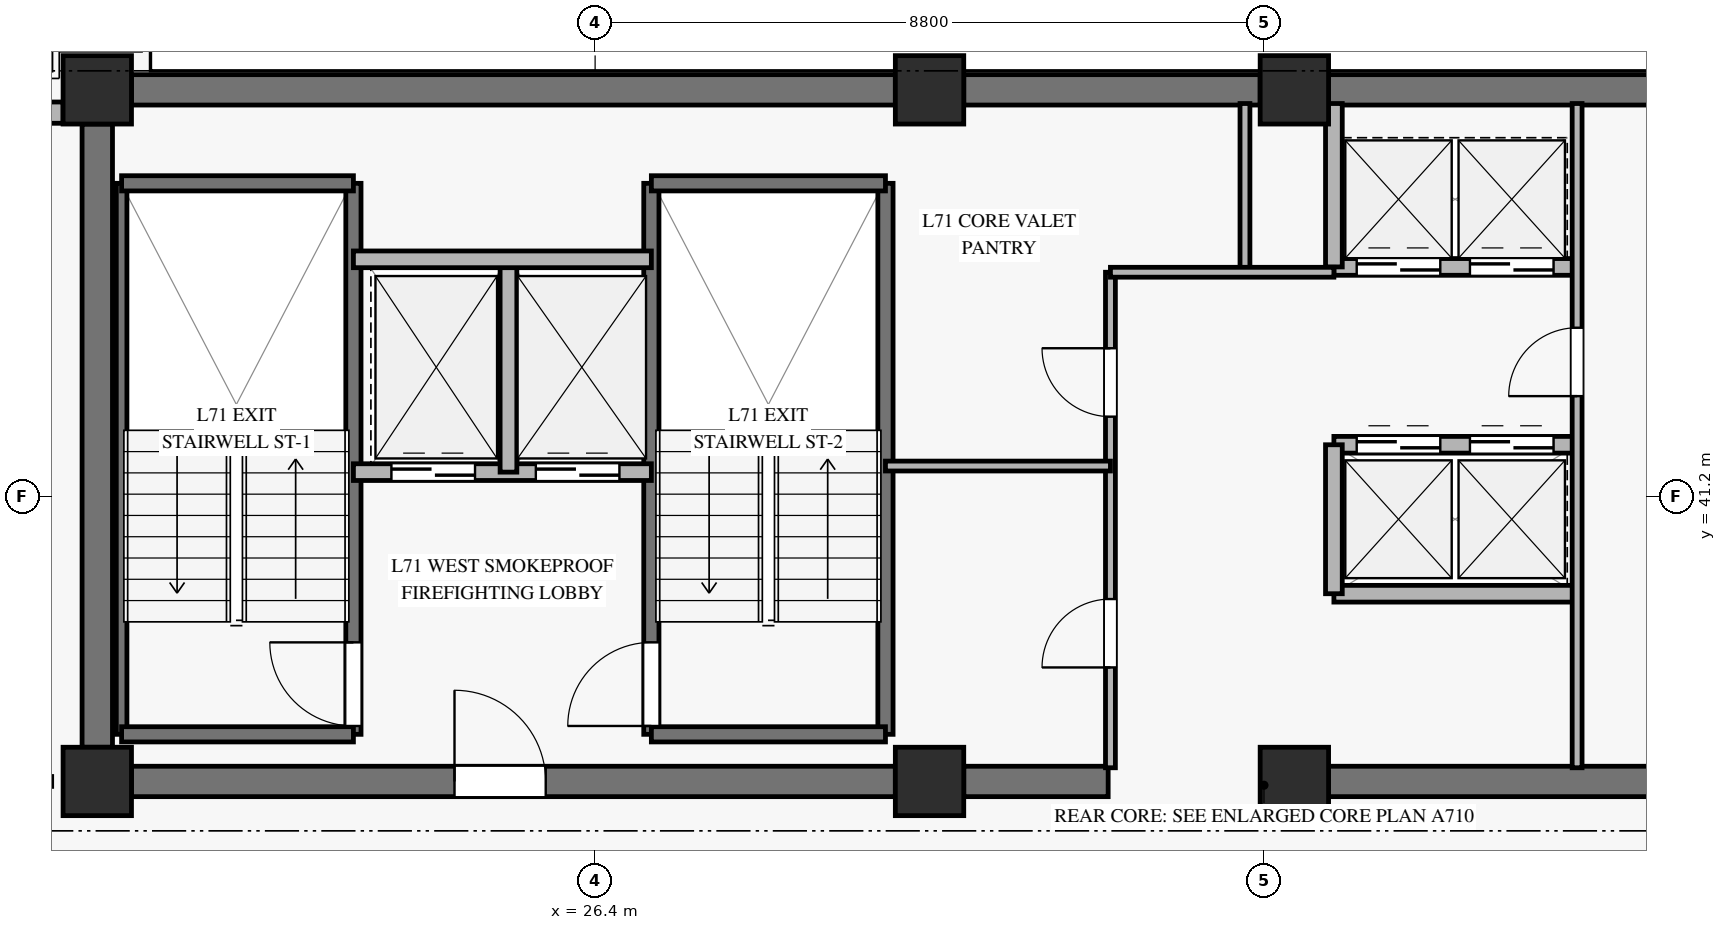
"""IFC4 building model, lengths in metres.
Left out: names, types, materials, properties, quantities, classifications, styles, units other than length and angle.
Written with IfcOpenShell. Run it as: python <this file> out.ifc"""

import sys

from ifc_helpers import new_model, si_unit, direction, frame, frame_2d, origin, origin_2d, place, context, subcontext, project, spatial, rectangle, extrude, source, transform, mapped, element, fill, save


model = new_model("IFC4")
c1 = context("Model", 3, precision=1e-05, world=origin(), true_north=direction((0.0, 1.0)))
c2 = subcontext(c1, "Body", "Model", "MODEL_VIEW")
j1 = project(units=[si_unit("LENGTHUNIT", "METRE"), si_unit("PLANEANGLEUNIT", "RADIAN")], contexts=[c1])
p1 = place(None, origin())
s1 = spatial("IfcSite", under=j1, at=p1, CompositionType="ELEMENT")
p2 = place(p1, origin())
s2 = spatial("IfcBuilding", under=s1, at=p2, CompositionType="ELEMENT")
p3 = place(p2, frame((0.0, 0.0, 275.7)))
s3 = spatial("IfcBuildingStorey", under=s2, at=p3, CompositionType="ELEMENT", Elevation=275.7)
m1 = source(origin(), c2, "Body", "SweptSolid", [
    extrude(rectangle(XDim=0.9, YDim=0.9, at=origin_2d()), origin(), (0.0, 0.0, 1.0), 3.14),
])
for number, where, z_axis, x_axis in (
    (1, (19.85, 37.45, 0.0), (0.0, 0.0, 1.0), (1.0, 0.0, 0.0)),
    (2, (19.85, 46.55, 0.0), (0.0, 0.0, 1.0), (1.0, 0.0, 0.0)),
    (3, (30.8, 37.45, 0.0), (0.0, 0.0, 1.0), (1.0, 0.0, 0.0)),
    (4, (30.8, 46.55, 0.0), (0.0, 0.0, 1.0), (1.0, 0.0, 0.0)),
    (5, (35.6, 37.45, 0.0), (0.0, 0.0, 1.0), (1.0, 0.0, 0.0)),
    (6, (35.6, 46.55, 0.0), (0.0, 0.0, 1.0), (1.0, 0.0, 0.0)),
):
    element("IfcColumn", number, at=place(p3, frame(where, z_axis=z_axis, x_axis=x_axis)), inside=s3, PredefinedType="PILASTER", context=c2, shape_type="MappedRepresentation", body=[
        mapped(m1, transform((0.0, 0.0, 0.0), x_axis=(1.0, 0.0, 0.0), y_axis=(0.0, 1.0, 0.0), z_axis=(0.0, 0.0, 1.0), scale=1.0)),
    ])
p4 = place(p3, frame((20.3, 46.55, 0.0), z_axis=(0.0, 0.0, 1.0), x_axis=(1.0, 0.0, 0.0)))
e7 = element("IfcWall", 7, at=p4, inside=s3, PredefinedType="SHEAR", context=c2, shape_type="SweptSolid", body=[
    extrude(rectangle(XDim=10.05, YDim=0.4, at=frame_2d((5.025, 0.0))), origin(), (0.0, 0.0, 1.0), 3.14),
])
p5 = place(p3, frame((31.25, 46.55, 0.0), z_axis=(0.0, 0.0, 1.0), x_axis=(1.0, 0.0, 0.0)))
e8 = element("IfcWall", 8, at=p5, inside=s3, PredefinedType="SHEAR", context=c2, shape_type="SweptSolid", body=[
    extrude(rectangle(XDim=3.9, YDim=0.4, at=frame_2d((1.95, 0.0))), origin(), (0.0, 0.0, 1.0), 3.14),
])
p6 = place(p3, frame((36.05, 46.55, 0.0), z_axis=(0.0, 0.0, 1.0), x_axis=(1.0, 0.0, 0.0)))
e9 = element("IfcWall", 9, at=p6, inside=s3, PredefinedType="SHEAR", context=c2, shape_type="SweptSolid", body=[
    extrude(rectangle(XDim=7.8, YDim=0.4, at=frame_2d((3.9, 0.0))), origin(), (0.0, 0.0, 1.0), 3.14),
])
p7 = place(p3, frame((20.3, 37.45, 0.0), z_axis=(0.0, 0.0, 1.0), x_axis=(1.0, 0.0, 0.0)))
e10 = element("IfcWall", 10, at=p7, inside=s3, PredefinedType="SHEAR", context=c2, shape_type="SweptSolid", body=[
    extrude(rectangle(XDim=10.05, YDim=0.4, at=frame_2d((5.025, 0.0))), origin(), (0.0, 0.0, 1.0), 3.14),
])
p8 = place(p7, frame((4.25, 0.0, 0.0)))
e11 = element("IfcOpeningElement", 11, at=p8, cuts=e10, PredefinedType="OPENING", context=c2, shape_type="SweptSolid", body=[
    extrude(rectangle(XDim=1.2, YDim=2.15, at=frame_2d((0.6, 1.075))), frame((0.0, 0.21, 0.0), z_axis=(0.0, -1.0, 0.0), x_axis=(1.0, 0.0, 0.0)), (0.0, 0.0, 1.0), 0.42),
])
p9 = place(p3, frame((31.25, 37.45, 0.0), z_axis=(0.0, 0.0, 1.0), x_axis=(1.0, 0.0, 0.0)))
e12 = element("IfcWall", 12, at=p9, inside=s3, PredefinedType="SHEAR", context=c2, shape_type="SweptSolid", body=[
    extrude(rectangle(XDim=1.9, YDim=0.4, at=frame_2d((0.95, 0.0))), origin(), (0.0, 0.0, 1.0), 3.14),
])
p10 = place(p3, frame((36.05, 37.45, 0.0), z_axis=(0.0, 0.0, 1.0), x_axis=(1.0, 0.0, 0.0)))
e13 = element("IfcWall", 13, at=p10, inside=s3, PredefinedType="SHEAR", context=c2, shape_type="SweptSolid", body=[
    extrude(rectangle(XDim=7.8, YDim=0.4, at=frame_2d((3.9, 0.0))), origin(), (0.0, 0.0, 1.0), 3.14),
])
p11 = place(p3, frame((19.85, 37.9, 0.0), z_axis=(0.0, 0.0, 1.0), x_axis=(0.0, 1.0, 0.0)))
e14 = element("IfcWall", 14, at=p11, inside=s3, PredefinedType="SHEAR", context=c2, shape_type="SweptSolid", body=[
    extrude(rectangle(XDim=8.2, YDim=0.4, at=frame_2d((4.1, 0.0))), origin(), (0.0, 0.0, 1.0), 3.14),
])
p12 = place(p3, frame((11.942, 46.25, 0.0), z_axis=(0.0, 0.0, 1.0), x_axis=(1.0, 0.0, 0.0)))
e15 = element("IfcWall", 15, at=p12, inside=s3, PredefinedType="SOLIDWALL", context=c2, shape_type="SweptSolid", body=[
    extrude(rectangle(XDim=7.458, YDim=0.28, at=frame_2d((3.729, 0.0))), origin(), (0.0, 0.0, 1.0), 2.77),
])
p13 = place(p12, frame((2.929, 0.0, 0.45)))
e16 = element("IfcOpeningElement", 16, at=p13, cuts=e15, PredefinedType="OPENING", context=c2, shape_type="SweptSolid", body=[
    extrude(rectangle(XDim=1.6, YDim=2.0, at=frame_2d((0.8, 1.0))), frame((0.0, 0.15, 0.0), z_axis=(0.0, -1.0, 0.0), x_axis=(1.0, 0.0, 0.0)), (0.0, 0.0, 1.0), 0.3),
])
p14 = place(p3, frame((20.17, 38.07, 0.0), z_axis=(0.0, 0.0, 1.0), x_axis=(0.0, 1.0, 0.0)))
e17 = element("IfcWall", 17, at=p14, inside=s3, PredefinedType="SOLIDWALL", context=c2, shape_type="SweptSolid", body=[
    extrude(rectangle(XDim=7.25, YDim=0.14, at=frame_2d((3.625, 0.0))), origin(), (0.0, 0.0, 1.0), 3.4),
])
p15 = place(p3, frame((23.22, 38.07, 0.0), z_axis=(0.0, 0.0, 1.0), x_axis=(0.0, 1.0, 0.0)))
e18 = element("IfcWall", 18, at=p15, inside=s3, PredefinedType="SOLIDWALL", context=c2, shape_type="SweptSolid", body=[
    extrude(rectangle(XDim=7.25, YDim=0.2, at=frame_2d((3.625, 0.0))), origin(), (0.0, 0.0, 1.0), 3.4),
])
p16 = place(p15, frame((0.11, 0.0, 0.0)))
e19 = element("IfcOpeningElement", 19, at=p16, cuts=e18, PredefinedType="OPENING", context=c2, shape_type="SweptSolid", body=[
    extrude(rectangle(XDim=1.1, YDim=2.15, at=frame_2d((0.55, 1.075))), frame((0.0, 0.11, 0.0), z_axis=(0.0, -1.0, 0.0), x_axis=(1.0, 0.0, 0.0)), (0.0, 0.0, 1.0), 0.22),
])
for number, where, z_axis, x_axis in (
    (20, (20.17, 45.32, 0.0), (0.0, 0.0, 1.0), (1.0, 0.0, 0.0)),
    (21, (20.17, 38.07, 0.0), (0.0, 0.0, 1.0), (1.0, 0.0, 0.0)),
):
    element("IfcWall", number, at=place(p3, frame(where, z_axis=z_axis, x_axis=x_axis)), inside=s3, PredefinedType="SOLIDWALL", context=c2, shape_type="SweptSolid", body=[
        extrude(rectangle(XDim=3.05, YDim=0.2, at=frame_2d((1.525, 0.0))), origin(), (0.0, 0.0, 1.0), 3.4),
    ])
p17 = place(p3, frame((27.14, 38.07, 0.0), z_axis=(0.0, 0.0, 1.0), x_axis=(0.0, 1.0, 0.0)))
e22 = element("IfcWall", 22, at=p17, inside=s3, PredefinedType="SOLIDWALL", context=c2, shape_type="SweptSolid", body=[
    extrude(rectangle(XDim=7.25, YDim=0.2, at=frame_2d((3.625, 0.0))), origin(), (0.0, 0.0, 1.0), 3.4),
])
p18 = place(p17, frame((0.11, 0.0, 0.0)))
e23 = element("IfcOpeningElement", 23, at=p18, cuts=e22, PredefinedType="OPENING", context=c2, shape_type="SweptSolid", body=[
    extrude(rectangle(XDim=1.1, YDim=2.15, at=frame_2d((0.55, 1.075))), frame((0.0, 0.11, 0.0), z_axis=(0.0, -1.0, 0.0), x_axis=(1.0, 0.0, 0.0)), (0.0, 0.0, 1.0), 0.22),
])
p19 = place(p3, frame((30.22, 38.07, 0.0), z_axis=(0.0, 0.0, 1.0), x_axis=(0.0, 1.0, 0.0)))
e24 = element("IfcWall", 24, at=p19, inside=s3, PredefinedType="SOLIDWALL", context=c2, shape_type="SweptSolid", body=[
    extrude(rectangle(XDim=7.25, YDim=0.2, at=frame_2d((3.625, 0.0))), origin(), (0.0, 0.0, 1.0), 3.4),
])
for number, where, z_axis, x_axis in (
    (25, (27.14, 45.32, 0.0), (0.0, 0.0, 1.0), (1.0, 0.0, 0.0)),
    (26, (27.14, 38.07, 0.0), (0.0, 0.0, 1.0), (1.0, 0.0, 0.0)),
):
    element("IfcWall", number, at=place(p3, frame(where, z_axis=z_axis, x_axis=x_axis)), inside=s3, PredefinedType="SOLIDWALL", context=c2, shape_type="SweptSolid", body=[
        extrude(rectangle(XDim=3.08, YDim=0.2, at=frame_2d((1.54, 0.0))), origin(), (0.0, 0.0, 1.0), 3.4),
    ])
p20 = place(p3, frame((23.22, 41.52, 0.0), z_axis=(0.0, 0.0, 1.0), x_axis=(1.0, 0.0, 0.0)))
e27 = element("IfcWall", 27, at=p20, inside=s3, PredefinedType="SOLIDWALL", context=c2, shape_type="SweptSolid", body=[
    extrude(rectangle(XDim=3.92, YDim=0.22, at=frame_2d((1.96, 0.0))), origin(), (0.0, 0.0, 1.0), 3.14),
])
p21 = place(p20, frame((0.5, 0.0, 0.0)))
e28 = element("IfcOpeningElement", 28, at=p21, cuts=e27, PredefinedType="OPENING", context=c2, shape_type="SweptSolid", body=[
    extrude(rectangle(XDim=1.1, YDim=2.2, at=frame_2d((0.55, 1.1))), frame((0.0, 0.12, 0.0), z_axis=(0.0, -1.0, 0.0), x_axis=(1.0, 0.0, 0.0)), (0.0, 0.0, 1.0), 0.24),
])
p22 = place(p20, frame((2.4, 0.0, 0.0)))
e29 = element("IfcOpeningElement", 29, at=p22, cuts=e27, PredefinedType="OPENING", context=c2, shape_type="SweptSolid", body=[
    extrude(rectangle(XDim=1.1, YDim=2.2, at=frame_2d((0.55, 1.1))), frame((0.0, 0.12, 0.0), z_axis=(0.0, -1.0, 0.0), x_axis=(1.0, 0.0, 0.0)), (0.0, 0.0, 1.0), 0.24),
])
p23 = place(p3, frame((25.26, 41.52, 0.0), z_axis=(0.0, 0.0, 1.0), x_axis=(0.0, 1.0, 0.0)))
e30 = element("IfcWall", 30, at=p23, inside=s3, PredefinedType="SOLIDWALL", context=c2, shape_type="SweptSolid", body=[
    extrude(rectangle(XDim=2.8, YDim=0.22, at=frame_2d((1.4, 0.0))), origin(), (0.0, 0.0, 1.0), 3.14),
])
p24 = place(p3, frame((23.22, 44.32, 0.0), z_axis=(0.0, 0.0, 1.0), x_axis=(1.0, 0.0, 0.0)))
e31 = element("IfcWall", 31, at=p24, inside=s3, PredefinedType="SOLIDWALL", context=c2, shape_type="SweptSolid", body=[
    extrude(rectangle(XDim=3.92, YDim=0.22, at=frame_2d((1.96, 0.0))), origin(), (0.0, 0.0, 1.0), 3.14),
])
p25 = place(p3, frame((36.12, 44.22, 0.0), z_axis=(0.0, 0.0, 1.0), x_axis=(1.0, 0.0, 0.0)))
e32 = element("IfcWall", 32, at=p25, inside=s3, PredefinedType="SOLIDWALL", context=c2, shape_type="SweptSolid", body=[
    extrude(rectangle(XDim=3.2, YDim=0.22, at=frame_2d((1.6, 0.0))), origin(), (0.0, 0.0, 1.0), 3.14),
])
p26 = place(p25, frame((0.3, 0.0, 0.0)))
e33 = element("IfcOpeningElement", 33, at=p26, cuts=e32, PredefinedType="OPENING", context=c2, shape_type="SweptSolid", body=[
    extrude(rectangle(XDim=1.1, YDim=2.2, at=frame_2d((0.55, 1.1))), frame((0.0, 0.12, 0.0), z_axis=(0.0, -1.0, 0.0), x_axis=(1.0, 0.0, 0.0)), (0.0, 0.0, 1.0), 0.24),
])
p27 = place(p25, frame((1.79, 0.0, 0.0)))
e34 = element("IfcOpeningElement", 34, at=p27, cuts=e32, PredefinedType="OPENING", context=c2, shape_type="SweptSolid", body=[
    extrude(rectangle(XDim=1.1, YDim=2.2, at=frame_2d((0.55, 1.1))), frame((0.0, 0.12, 0.0), z_axis=(0.0, -1.0, 0.0), x_axis=(1.0, 0.0, 0.0)), (0.0, 0.0, 1.0), 0.24),
])
p28 = place(p3, frame((36.12, 41.88, 0.0), z_axis=(0.0, 0.0, 1.0), x_axis=(1.0, 0.0, 0.0)))
e35 = element("IfcWall", 35, at=p28, inside=s3, PredefinedType="SOLIDWALL", context=c2, shape_type="SweptSolid", body=[
    extrude(rectangle(XDim=3.2, YDim=0.22, at=frame_2d((1.6, 0.0))), origin(), (0.0, 0.0, 1.0), 3.14),
])
p29 = place(p28, frame((0.3, 0.0, 0.0)))
e36 = element("IfcOpeningElement", 36, at=p29, cuts=e35, PredefinedType="OPENING", context=c2, shape_type="SweptSolid", body=[
    extrude(rectangle(XDim=1.1, YDim=2.2, at=frame_2d((0.55, 1.1))), frame((0.0, 0.12, 0.0), z_axis=(0.0, -1.0, 0.0), x_axis=(1.0, 0.0, 0.0)), (0.0, 0.0, 1.0), 0.24),
])
p30 = place(p28, frame((1.79, 0.0, 0.0)))
e37 = element("IfcOpeningElement", 37, at=p30, cuts=e35, PredefinedType="OPENING", context=c2, shape_type="SweptSolid", body=[
    extrude(rectangle(XDim=1.1, YDim=2.2, at=frame_2d((0.55, 1.1))), frame((0.0, 0.12, 0.0), z_axis=(0.0, -1.0, 0.0), x_axis=(1.0, 0.0, 0.0)), (0.0, 0.0, 1.0), 0.24),
])
p31 = place(p3, frame((36.12, 39.92, 0.0), z_axis=(0.0, 0.0, 1.0), x_axis=(1.0, 0.0, 0.0)))
e38 = element("IfcWall", 38, at=p31, inside=s3, PredefinedType="SOLIDWALL", context=c2, shape_type="SweptSolid", body=[
    extrude(rectangle(XDim=3.2, YDim=0.22, at=frame_2d((1.6, 0.0))), origin(), (0.0, 0.0, 1.0), 3.14),
])
p32 = place(p3, frame((36.12, 39.92, 0.0), z_axis=(0.0, 0.0, 1.0), x_axis=(0.0, 1.0, 0.0)))
e39 = element("IfcWall", 39, at=p32, inside=s3, PredefinedType="SOLIDWALL", context=c2, shape_type="SweptSolid", body=[
    extrude(rectangle(XDim=1.96, YDim=0.22, at=frame_2d((0.98, 0.0))), origin(), (0.0, 0.0, 1.0), 3.14),
])
p33 = place(p3, frame((36.12, 44.22, 0.0), z_axis=(0.0, 0.0, 1.0), x_axis=(0.0, 1.0, 0.0)))
e40 = element("IfcWall", 40, at=p33, inside=s3, PredefinedType="SOLIDWALL", context=c2, shape_type="SweptSolid", body=[
    extrude(rectangle(XDim=2.15, YDim=0.22, at=frame_2d((1.075, 0.0))), origin(), (0.0, 0.0, 1.0), 3.14),
])
p34 = place(p3, frame((33.18, 37.63, 0.0), z_axis=(0.0, 0.0, 1.0), x_axis=(0.0, 1.0, 0.0)))
e41 = element("IfcWall", 41, at=p34, inside=s3, PredefinedType="PARTITIONING", context=c2, shape_type="SweptSolid", body=[
    extrude(rectangle(XDim=6.52, YDim=0.13, at=frame_2d((3.26, 0.0))), origin(), (0.0, 0.0, 1.0), 2.225),
])
p35 = place(p34, frame((1.32, 0.0, 0.0)))
e42 = element("IfcOpeningElement", 42, at=p35, cuts=e41, PredefinedType="OPENING", context=c2, shape_type="SweptSolid", body=[
    extrude(rectangle(XDim=0.9, YDim=2.1, at=frame_2d((0.45, 1.05))), frame((0.0, 0.075, 0.0), z_axis=(0.0, -1.0, 0.0), x_axis=(1.0, 0.0, 0.0)), (0.0, 0.0, 1.0), 0.15),
])
p36 = place(p34, frame((4.62, 0.0, 0.0)))
e43 = element("IfcOpeningElement", 43, at=p36, cuts=e41, PredefinedType="OPENING", context=c2, shape_type="SweptSolid", body=[
    extrude(rectangle(XDim=0.9, YDim=2.1, at=frame_2d((0.45, 1.05))), frame((0.0, 0.075, 0.0), z_axis=(0.0, -1.0, 0.0), x_axis=(1.0, 0.0, 0.0)), (0.0, 0.0, 1.0), 0.15),
])
p37 = place(p3, frame((34.95, 44.15, 0.0), z_axis=(0.0, 0.0, 1.0), x_axis=(0.0, 1.0, 0.0)))
e44 = element("IfcWall", 44, at=p37, inside=s3, PredefinedType="PARTITIONING", context=c2, shape_type="SweptSolid", body=[
    extrude(rectangle(XDim=2.22, YDim=0.13, at=frame_2d((1.11, 0.0))), origin(), (0.0, 0.0, 1.0), 3.14),
])
p38 = place(p3, frame((33.18, 44.15, 0.0), z_axis=(0.0, 0.0, 1.0), x_axis=(1.0, 0.0, 0.0)))
e45 = element("IfcWall", 45, at=p38, inside=s3, PredefinedType="PARTITIONING", context=c2, shape_type="SweptSolid", body=[
    extrude(rectangle(XDim=2.94, YDim=0.13, at=frame_2d((1.47, 0.0))), origin(), (0.0, 0.0, 1.0), 2.425),
])
p39 = place(p3, frame((39.32, 37.63, 0.0), z_axis=(0.0, 0.0, 1.0), x_axis=(0.0, 1.0, 0.0)))
e46 = element("IfcWall", 46, at=p39, inside=s3, PredefinedType="PARTITIONING", context=c2, shape_type="SweptSolid", body=[
    extrude(rectangle(XDim=8.74, YDim=0.13, at=frame_2d((4.37, 0.0))), origin(), (0.0, 0.0, 1.0), 3.14),
])
p40 = place(p39, frame((4.89, 0.0, 0.0)))
e47 = element("IfcOpeningElement", 47, at=p40, cuts=e46, PredefinedType="OPENING", context=c2, shape_type="SweptSolid", body=[
    extrude(rectangle(XDim=0.9, YDim=2.1, at=frame_2d((0.45, 1.05))), frame((0.0, 0.075, 0.0), z_axis=(0.0, -1.0, 0.0), x_axis=(1.0, 0.0, 0.0)), (0.0, 0.0, 1.0), 0.15),
])
p41 = place(p3, frame((30.22, 41.6, 0.0), z_axis=(0.0, 0.0, 1.0), x_axis=(1.0, 0.0, 0.0)))
e48 = element("IfcWall", 48, at=p41, inside=s3, PredefinedType="PARTITIONING", context=c2, shape_type="SweptSolid", body=[
    extrude(rectangle(XDim=2.96, YDim=0.13, at=frame_2d((1.48, 0.0))), origin(), (0.0, 0.0, 1.0), 2.425),
])
m2 = source(origin(), c2, "Body", "SweptSolid", [
    extrude(rectangle(XDim=1.1, YDim=2.15, at=frame_2d((0.55, 1.075))), frame((0.0, 0.025, 0.0), z_axis=(0.0, -1.0, 0.0), x_axis=(1.0, 0.0, 0.0)), (0.0, 0.0, 1.0), 0.05),
])
p42 = place(p16, origin())
e49 = element("IfcDoor", 49, at=p42, inside=s3, OperationType="SINGLE_SWING_RIGHT", PredefinedType="DOOR", context=c2, shape_type="MappedRepresentation", body=[
    mapped(m2, transform((0.0, 0.0, 0.0), x_axis=(1.0, 0.0, 0.0), y_axis=(0.0, 1.0, 0.0), z_axis=(0.0, 0.0, 1.0), scale=1.0)),
])
fill(e19, e49)
p43 = place(p18, origin())
e50 = element("IfcDoor", 50, at=p43, inside=s3, OperationType="SINGLE_SWING_LEFT", PredefinedType="DOOR", context=c2, shape_type="MappedRepresentation", body=[
    mapped(m2, transform((0.0, 0.0, 0.0), x_axis=(1.0, 0.0, 0.0), y_axis=(0.0, 1.0, 0.0), z_axis=(0.0, 0.0, 1.0), scale=1.0)),
])
fill(e23, e50)
m3 = source(origin(), c2, "Body", "SweptSolid", [
    extrude(rectangle(XDim=1.1, YDim=2.2, at=frame_2d((0.55, 1.1))), frame((0.0, 0.025, 0.0), z_axis=(0.0, -1.0, 0.0), x_axis=(1.0, 0.0, 0.0)), (0.0, 0.0, 1.0), 0.05),
])
p44 = place(p21, origin())
e51 = element("IfcDoor", 51, at=p44, inside=s3, OperationType="SLIDING_TO_LEFT", PredefinedType="DOOR", context=c2, shape_type="MappedRepresentation", body=[
    mapped(m3, transform((0.0, 0.0, 0.0), x_axis=(1.0, 0.0, 0.0), y_axis=(0.0, 1.0, 0.0), z_axis=(0.0, 0.0, 1.0), scale=1.0)),
])
fill(e28, e51)
p45 = place(p22, origin())
e52 = element("IfcDoor", 52, at=p45, inside=s3, OperationType="SLIDING_TO_LEFT", PredefinedType="DOOR", context=c2, shape_type="MappedRepresentation", body=[
    mapped(m3, transform((0.0, 0.0, 0.0), x_axis=(1.0, 0.0, 0.0), y_axis=(0.0, 1.0, 0.0), z_axis=(0.0, 0.0, 1.0), scale=1.0)),
])
fill(e29, e52)
m4 = source(origin(), c2, "Body", "SweptSolid", [
    extrude(rectangle(XDim=1.2, YDim=2.15, at=frame_2d((0.6, 1.075))), frame((0.0, 0.025, 0.0), z_axis=(0.0, -1.0, 0.0), x_axis=(1.0, 0.0, 0.0)), (0.0, 0.0, 1.0), 0.05),
])
p46 = place(p8, origin())
e53 = element("IfcDoor", 53, at=p46, inside=s3, OperationType="SINGLE_SWING_LEFT", PredefinedType="DOOR", context=c2, shape_type="MappedRepresentation", body=[
    mapped(m4, transform((0.0, 0.0, 0.0), x_axis=(1.0, 0.0, 0.0), y_axis=(0.0, 1.0, 0.0), z_axis=(0.0, 0.0, 1.0), scale=1.0)),
])
fill(e11, e53)
p47 = place(p26, origin())
e54 = element("IfcDoor", 54, at=p47, inside=s3, OperationType="SLIDING_TO_LEFT", PredefinedType="DOOR", context=c2, shape_type="MappedRepresentation", body=[
    mapped(m3, transform((0.0, 0.0, 0.0), x_axis=(1.0, 0.0, 0.0), y_axis=(0.0, 1.0, 0.0), z_axis=(0.0, 0.0, 1.0), scale=1.0)),
])
fill(e33, e54)
p48 = place(p27, origin())
e55 = element("IfcDoor", 55, at=p48, inside=s3, OperationType="SLIDING_TO_LEFT", PredefinedType="DOOR", context=c2, shape_type="MappedRepresentation", body=[
    mapped(m3, transform((0.0, 0.0, 0.0), x_axis=(1.0, 0.0, 0.0), y_axis=(0.0, 1.0, 0.0), z_axis=(0.0, 0.0, 1.0), scale=1.0)),
])
fill(e34, e55)
p49 = place(p29, origin())
e56 = element("IfcDoor", 56, at=p49, inside=s3, OperationType="SLIDING_TO_LEFT", PredefinedType="DOOR", context=c2, shape_type="MappedRepresentation", body=[
    mapped(m3, transform((0.0, 0.0, 0.0), x_axis=(1.0, 0.0, 0.0), y_axis=(0.0, 1.0, 0.0), z_axis=(0.0, 0.0, 1.0), scale=1.0)),
])
fill(e36, e56)
p50 = place(p30, origin())
e57 = element("IfcDoor", 57, at=p50, inside=s3, OperationType="SLIDING_TO_LEFT", PredefinedType="DOOR", context=c2, shape_type="MappedRepresentation", body=[
    mapped(m3, transform((0.0, 0.0, 0.0), x_axis=(1.0, 0.0, 0.0), y_axis=(0.0, 1.0, 0.0), z_axis=(0.0, 0.0, 1.0), scale=1.0)),
])
fill(e37, e57)
m5 = source(origin(), c2, "Body", "SweptSolid", [
    extrude(rectangle(XDim=0.9, YDim=2.1, at=frame_2d((0.45, 1.05))), frame((0.0, 0.025, 0.0), z_axis=(0.0, -1.0, 0.0), x_axis=(1.0, 0.0, 0.0)), (0.0, 0.0, 1.0), 0.05),
])
p51 = place(p35, origin())
e58 = element("IfcDoor", 58, at=p51, inside=s3, OperationType="SINGLE_SWING_LEFT", PredefinedType="DOOR", context=c2, shape_type="MappedRepresentation", body=[
    mapped(m5, transform((0.0, 0.0, 0.0), x_axis=(1.0, 0.0, 0.0), y_axis=(0.0, 1.0, 0.0), z_axis=(0.0, 0.0, 1.0), scale=1.0)),
])
fill(e42, e58)
p52 = place(p36, origin())
e59 = element("IfcDoor", 59, at=p52, inside=s3, OperationType="SINGLE_SWING_RIGHT", PredefinedType="DOOR", context=c2, shape_type="MappedRepresentation", body=[
    mapped(m5, transform((0.0, 0.0, 0.0), x_axis=(1.0, 0.0, 0.0), y_axis=(0.0, 1.0, 0.0), z_axis=(0.0, 0.0, 1.0), scale=1.0)),
])
fill(e43, e59)
p53 = place(p40, origin())
e60 = element("IfcDoor", 60, at=p53, inside=s3, OperationType="SINGLE_SWING_LEFT", PredefinedType="DOOR", context=c2, shape_type="MappedRepresentation", body=[
    mapped(m5, transform((0.0, 0.0, 0.0), x_axis=(1.0, 0.0, 0.0), y_axis=(0.0, 1.0, 0.0), z_axis=(0.0, 0.0, 1.0), scale=1.0)),
])
fill(e47, e60)
save(model, sys.argv[1])
